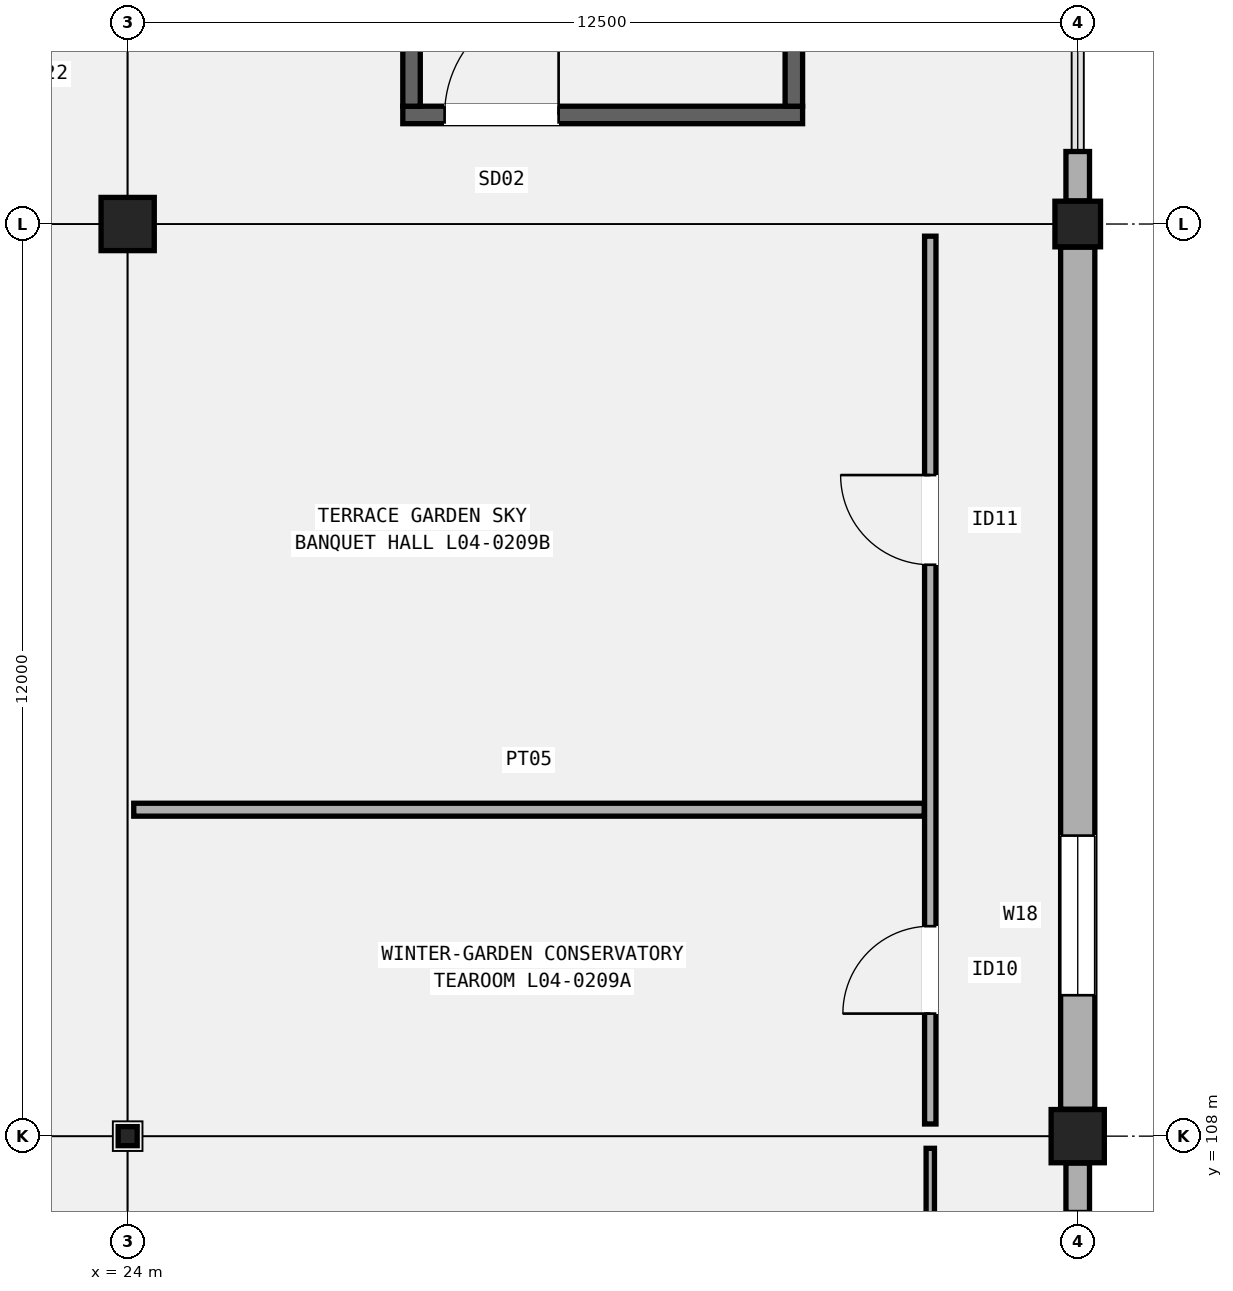
"""IFC4 building model, lengths in metres.
Left out: names, types, materials, properties, quantities, classifications, styles, units other than length and angle.
Written with IfcOpenShell. Run it as: python <this file> out.ifc"""

import sys

from ifc_helpers import new_model, si_unit, direction, frame, frame_2d, origin, origin_2d, place, context, subcontext, project, spatial, rectangle, hollow_rectangle, extrude, element, fill, save


model = new_model("IFC4")
c1 = context("Model", 3, precision=1e-05, world=origin(), true_north=direction((0.0, 1.0)))
c2 = subcontext(c1, "Body", "Model", "MODEL_VIEW")
j1 = project(units=[si_unit("LENGTHUNIT", "METRE"), si_unit("PLANEANGLEUNIT", "RADIAN")], contexts=[c1])
p1 = place(None, origin())
s1 = spatial("IfcSite", under=j1, at=p1, CompositionType="ELEMENT")
p2 = place(p1, origin())
s2 = spatial("IfcBuilding", under=s1, at=p2, CompositionType="ELEMENT")
p3 = place(p2, frame((0.0, 0.0, 20.4)))
s3 = spatial("IfcBuildingStorey", under=s2, at=p3, CompositionType="ELEMENT", Elevation=20.4)
p4 = place(p3, frame((24.0, 108.0, 0.0), z_axis=(0.0, 0.0, 1.0), x_axis=(1.0, 0.0, 0.0)))
e1 = element("IfcColumn", 1, at=p4, inside=s3, PredefinedType="COLUMN", context=c2, shape_type="SweptSolid", body=[
    extrude(hollow_rectangle(XDim=0.25, YDim=0.25, WallThickness=0.012, InnerFilletRadius=0.012, OuterFilletRadius=0.024, at=origin_2d()), origin(), (0.0, 0.0, 1.0), 5.4),
])
for number, where, z_axis, x_axis in (
    (2, (24.0, 120.0, 0.0), (0.0, 0.0, 1.0), (1.0, 0.0, 0.0)),
    (3, (36.5, 108.0, 0.0), (0.0, 0.0, 1.0), (1.0, 0.0, 0.0)),
):
    element("IfcColumn", number, at=place(p3, frame(where, z_axis=z_axis, x_axis=x_axis)), inside=s3, PredefinedType="COLUMN", context=c2, shape_type="SweptSolid", body=[
        extrude(rectangle(XDim=0.7, YDim=0.7, at=origin_2d()), origin(), (0.0, 0.0, 1.0), 5.4),
    ])
p5 = place(p3, frame((36.5, 120.0, 0.0), z_axis=(0.0, 0.0, 1.0), x_axis=(1.0, 0.0, 0.0)))
e4 = element("IfcColumn", 4, at=p5, inside=s3, PredefinedType="COLUMN", context=c2, shape_type="SweptSolid", body=[
    extrude(rectangle(XDim=0.6, YDim=0.6, at=origin_2d()), origin(), (0.0, 0.0, 1.0), 5.4),
])
p6 = place(p3, frame((36.5, 106.996, 0.0), z_axis=(0.0, 0.0, 1.0), x_axis=(0.0, 1.0, 0.0)))
e5 = element("IfcWall", 5, at=p6, inside=s3, PredefinedType="SOLIDWALL", context=c2, shape_type="SweptSolid", body=[
    extrude(rectangle(XDim=0.65, YDim=0.31, at=frame_2d((0.325, 0.0))), origin(), (0.0, 0.0, 1.0), 4.592),
])
p7 = place(p3, frame((36.5, 108.354, 0.0), z_axis=(0.0, 0.0, 1.0), x_axis=(0.0, 1.0, 0.0)))
e6 = element("IfcWall", 6, at=p7, inside=s3, PredefinedType="SOLIDWALL", context=c2, shape_type="SweptSolid", body=[
    extrude(rectangle(XDim=11.342, YDim=0.45, at=frame_2d((5.671, 0.0))), origin(), (0.0, 0.0, 1.0), 4.48),
])
p8 = place(p7, frame((1.5, 0.0, 0.95)))
e7 = element("IfcOpeningElement", 7, at=p8, cuts=e6, PredefinedType="OPENING", context=c2, shape_type="SweptSolid", body=[
    extrude(rectangle(XDim=2.1, YDim=1.85, at=frame_2d((1.05, 0.925))), frame((0.0, 0.235, 0.0), z_axis=(0.0, -1.0, 0.0), x_axis=(1.0, 0.0, 0.0)), (0.0, 0.0, 1.0), 0.47),
])
p9 = place(p3, frame((36.5, 120.304, 0.0), z_axis=(0.0, 0.0, 1.0), x_axis=(0.0, 1.0, 0.0)))
e8 = element("IfcWall", 8, at=p9, inside=s3, PredefinedType="SOLIDWALL", context=c2, shape_type="SweptSolid", body=[
    extrude(rectangle(XDim=0.65, YDim=0.31, at=frame_2d((0.325, 0.0))), origin(), (0.0, 0.0, 1.0), 4.58),
])
p10 = place(p3, frame((27.62, 121.435, 0.0), z_axis=(0.0, 0.0, 1.0), x_axis=(1.0, 0.0, 0.0)))
e9 = element("IfcWall", 9, at=p10, inside=s3, PredefinedType="SHEAR", context=c2, shape_type="SweptSolid", body=[
    extrude(rectangle(XDim=5.26, YDim=0.23, at=frame_2d((2.63, 0.0))), origin(), (0.0, 0.0, 1.0), 5.18),
])
p11 = place(p10, frame((0.55, 0.0, 0.0)))
e10 = element("IfcOpeningElement", 10, at=p11, cuts=e9, PredefinedType="OPENING", context=c2, shape_type="SweptSolid", body=[
    extrude(rectangle(XDim=1.5, YDim=2.2, at=frame_2d((0.75, 1.1))), frame((0.0, 0.125, 0.0), z_axis=(0.0, -1.0, 0.0), x_axis=(1.0, 0.0, 0.0)), (0.0, 0.0, 1.0), 0.25),
])
for number, where, z_axis, x_axis in (
    (11, (27.735, 121.55, 0.0), (0.0, 0.0, 1.0), (0.0, 1.0, 0.0)),
    (12, (32.765, 121.55, 0.0), (0.0, 0.0, 1.0), (0.0, 1.0, 0.0)),
):
    element("IfcWall", number, at=place(p3, frame(where, z_axis=z_axis, x_axis=x_axis)), inside=s3, PredefinedType="SHEAR", context=c2, shape_type="SweptSolid", body=[
        extrude(rectangle(XDim=8.9, YDim=0.23, at=frame_2d((4.45, 0.0))), origin(), (0.0, 0.0, 1.0), 5.18),
    ])
p12 = place(p3, frame((34.56, 97.87, 0.0), z_axis=(0.0, 0.0, 1.0), x_axis=(0.0, 1.0, 0.0)))
e13 = element("IfcWall", 13, at=p12, inside=s3, PredefinedType="PARTITIONING", context=c2, shape_type="SweptSolid", body=[
    extrude(rectangle(XDim=9.97, YDim=0.11, at=frame_2d((4.985, 0.0))), origin(), (0.0, 0.0, 1.0), 4.52),
])
p13 = place(p12, frame((1.958, 0.0, 0.0)))
e14 = element("IfcOpeningElement", 14, at=p13, cuts=e13, PredefinedType="OPENING", context=c2, shape_type="SweptSolid", body=[
    extrude(rectangle(XDim=1.09, YDim=2.16, at=frame_2d((0.545, 1.08))), frame((0.0, 0.065, 0.0), z_axis=(0.0, -1.0, 0.0), x_axis=(1.0, 0.0, 0.0)), (0.0, 0.0, 1.0), 0.13),
])
p14 = place(p12, frame((7.007, 0.0, 0.0)))
e15 = element("IfcOpeningElement", 15, at=p14, cuts=e13, PredefinedType="OPENING", context=c2, shape_type="SweptSolid", body=[
    extrude(rectangle(XDim=1.12, YDim=2.18, at=frame_2d((0.56, 1.09))), frame((0.0, 0.065, 0.0), z_axis=(0.0, -1.0, 0.0), x_axis=(1.0, 0.0, 0.0)), (0.0, 0.0, 1.0), 0.13),
])
p15 = place(p3, frame((34.56, 108.16, 0.0), z_axis=(0.0, 0.0, 1.0), x_axis=(0.0, 1.0, 0.0)))
e16 = element("IfcWall", 16, at=p15, inside=s3, PredefinedType="PARTITIONING", context=c2, shape_type="SweptSolid", body=[
    extrude(rectangle(XDim=11.68, YDim=0.15, at=frame_2d((5.84, 0.0))), origin(), (0.0, 0.0, 1.0), 4.52),
])
p16 = place(p15, frame((1.452, 0.0, 0.0)))
e17 = element("IfcOpeningElement", 17, at=p16, cuts=e16, PredefinedType="OPENING", context=c2, shape_type="SweptSolid", body=[
    extrude(rectangle(XDim=1.15, YDim=2.15, at=frame_2d((0.575, 1.075))), frame((0.0, 0.085, 0.0), z_axis=(0.0, -1.0, 0.0), x_axis=(1.0, 0.0, 0.0)), (0.0, 0.0, 1.0), 0.17),
])
p17 = place(p15, frame((7.357, 0.0, 0.0)))
e18 = element("IfcOpeningElement", 18, at=p17, cuts=e16, PredefinedType="OPENING", context=c2, shape_type="SweptSolid", body=[
    extrude(rectangle(XDim=1.18, YDim=2.2, at=frame_2d((0.59, 1.1))), frame((0.0, 0.085, 0.0), z_axis=(0.0, -1.0, 0.0), x_axis=(1.0, 0.0, 0.0)), (0.0, 0.0, 1.0), 0.17),
])
p18 = place(p3, frame((24.08, 112.295, 0.0), z_axis=(0.0, 0.0, 1.0), x_axis=(1.0, 0.0, 0.0)))
e19 = element("IfcWall", 19, at=p18, inside=s3, PredefinedType="PARTITIONING", context=c2, shape_type="SweptSolid", body=[
    extrude(rectangle(XDim=10.4, YDim=0.17, at=frame_2d((5.2, 0.0))), origin(), (0.0, 0.0, 1.0), 4.52),
])
p19 = place(p8, origin())
e20 = element("IfcWindow", 20, at=p19, inside=s3, PartitioningType="SINGLE_PANEL", PredefinedType="WINDOW", context=c2, shape_type="SweptSolid", body=[
    extrude(rectangle(XDim=2.1, YDim=1.85, at=frame_2d((1.05, 0.925))), frame((0.0, 0.03, 0.0), z_axis=(0.0, -1.0, 0.0), x_axis=(1.0, 0.0, 0.0)), (0.0, 0.0, 1.0), 0.06),
])
fill(e7, e20)
p20 = place(p11, origin())
e21 = element("IfcDoor", 21, at=p20, inside=s3, OperationType="SINGLE_SWING_RIGHT", PredefinedType="DOOR", context=c2, shape_type="SweptSolid", body=[
    extrude(rectangle(XDim=1.5, YDim=2.2, at=frame_2d((0.75, 1.1))), frame((0.0, 0.025, 0.0), z_axis=(0.0, -1.0, 0.0), x_axis=(1.0, 0.0, 0.0)), (0.0, 0.0, 1.0), 0.05),
])
fill(e10, e21)
p21 = place(p16, origin())
e22 = element("IfcDoor", 22, at=p21, inside=s3, OperationType="SINGLE_SWING_LEFT", PredefinedType="DOOR", context=c2, shape_type="SweptSolid", body=[
    extrude(rectangle(XDim=1.15, YDim=2.15, at=frame_2d((0.575, 1.075))), frame((0.0, 0.025, 0.0), z_axis=(0.0, -1.0, 0.0), x_axis=(1.0, 0.0, 0.0)), (0.0, 0.0, 1.0), 0.05),
])
fill(e17, e22)
p22 = place(p17, origin())
e23 = element("IfcDoor", 23, at=p22, inside=s3, OperationType="SINGLE_SWING_RIGHT", PredefinedType="DOOR", context=c2, shape_type="SweptSolid", body=[
    extrude(rectangle(XDim=1.18, YDim=2.2, at=frame_2d((0.59, 1.1))), frame((0.0, 0.025, 0.0), z_axis=(0.0, -1.0, 0.0), x_axis=(1.0, 0.0, 0.0)), (0.0, 0.0, 1.0), 0.05),
])
fill(e18, e23)
save(model, sys.argv[1])
